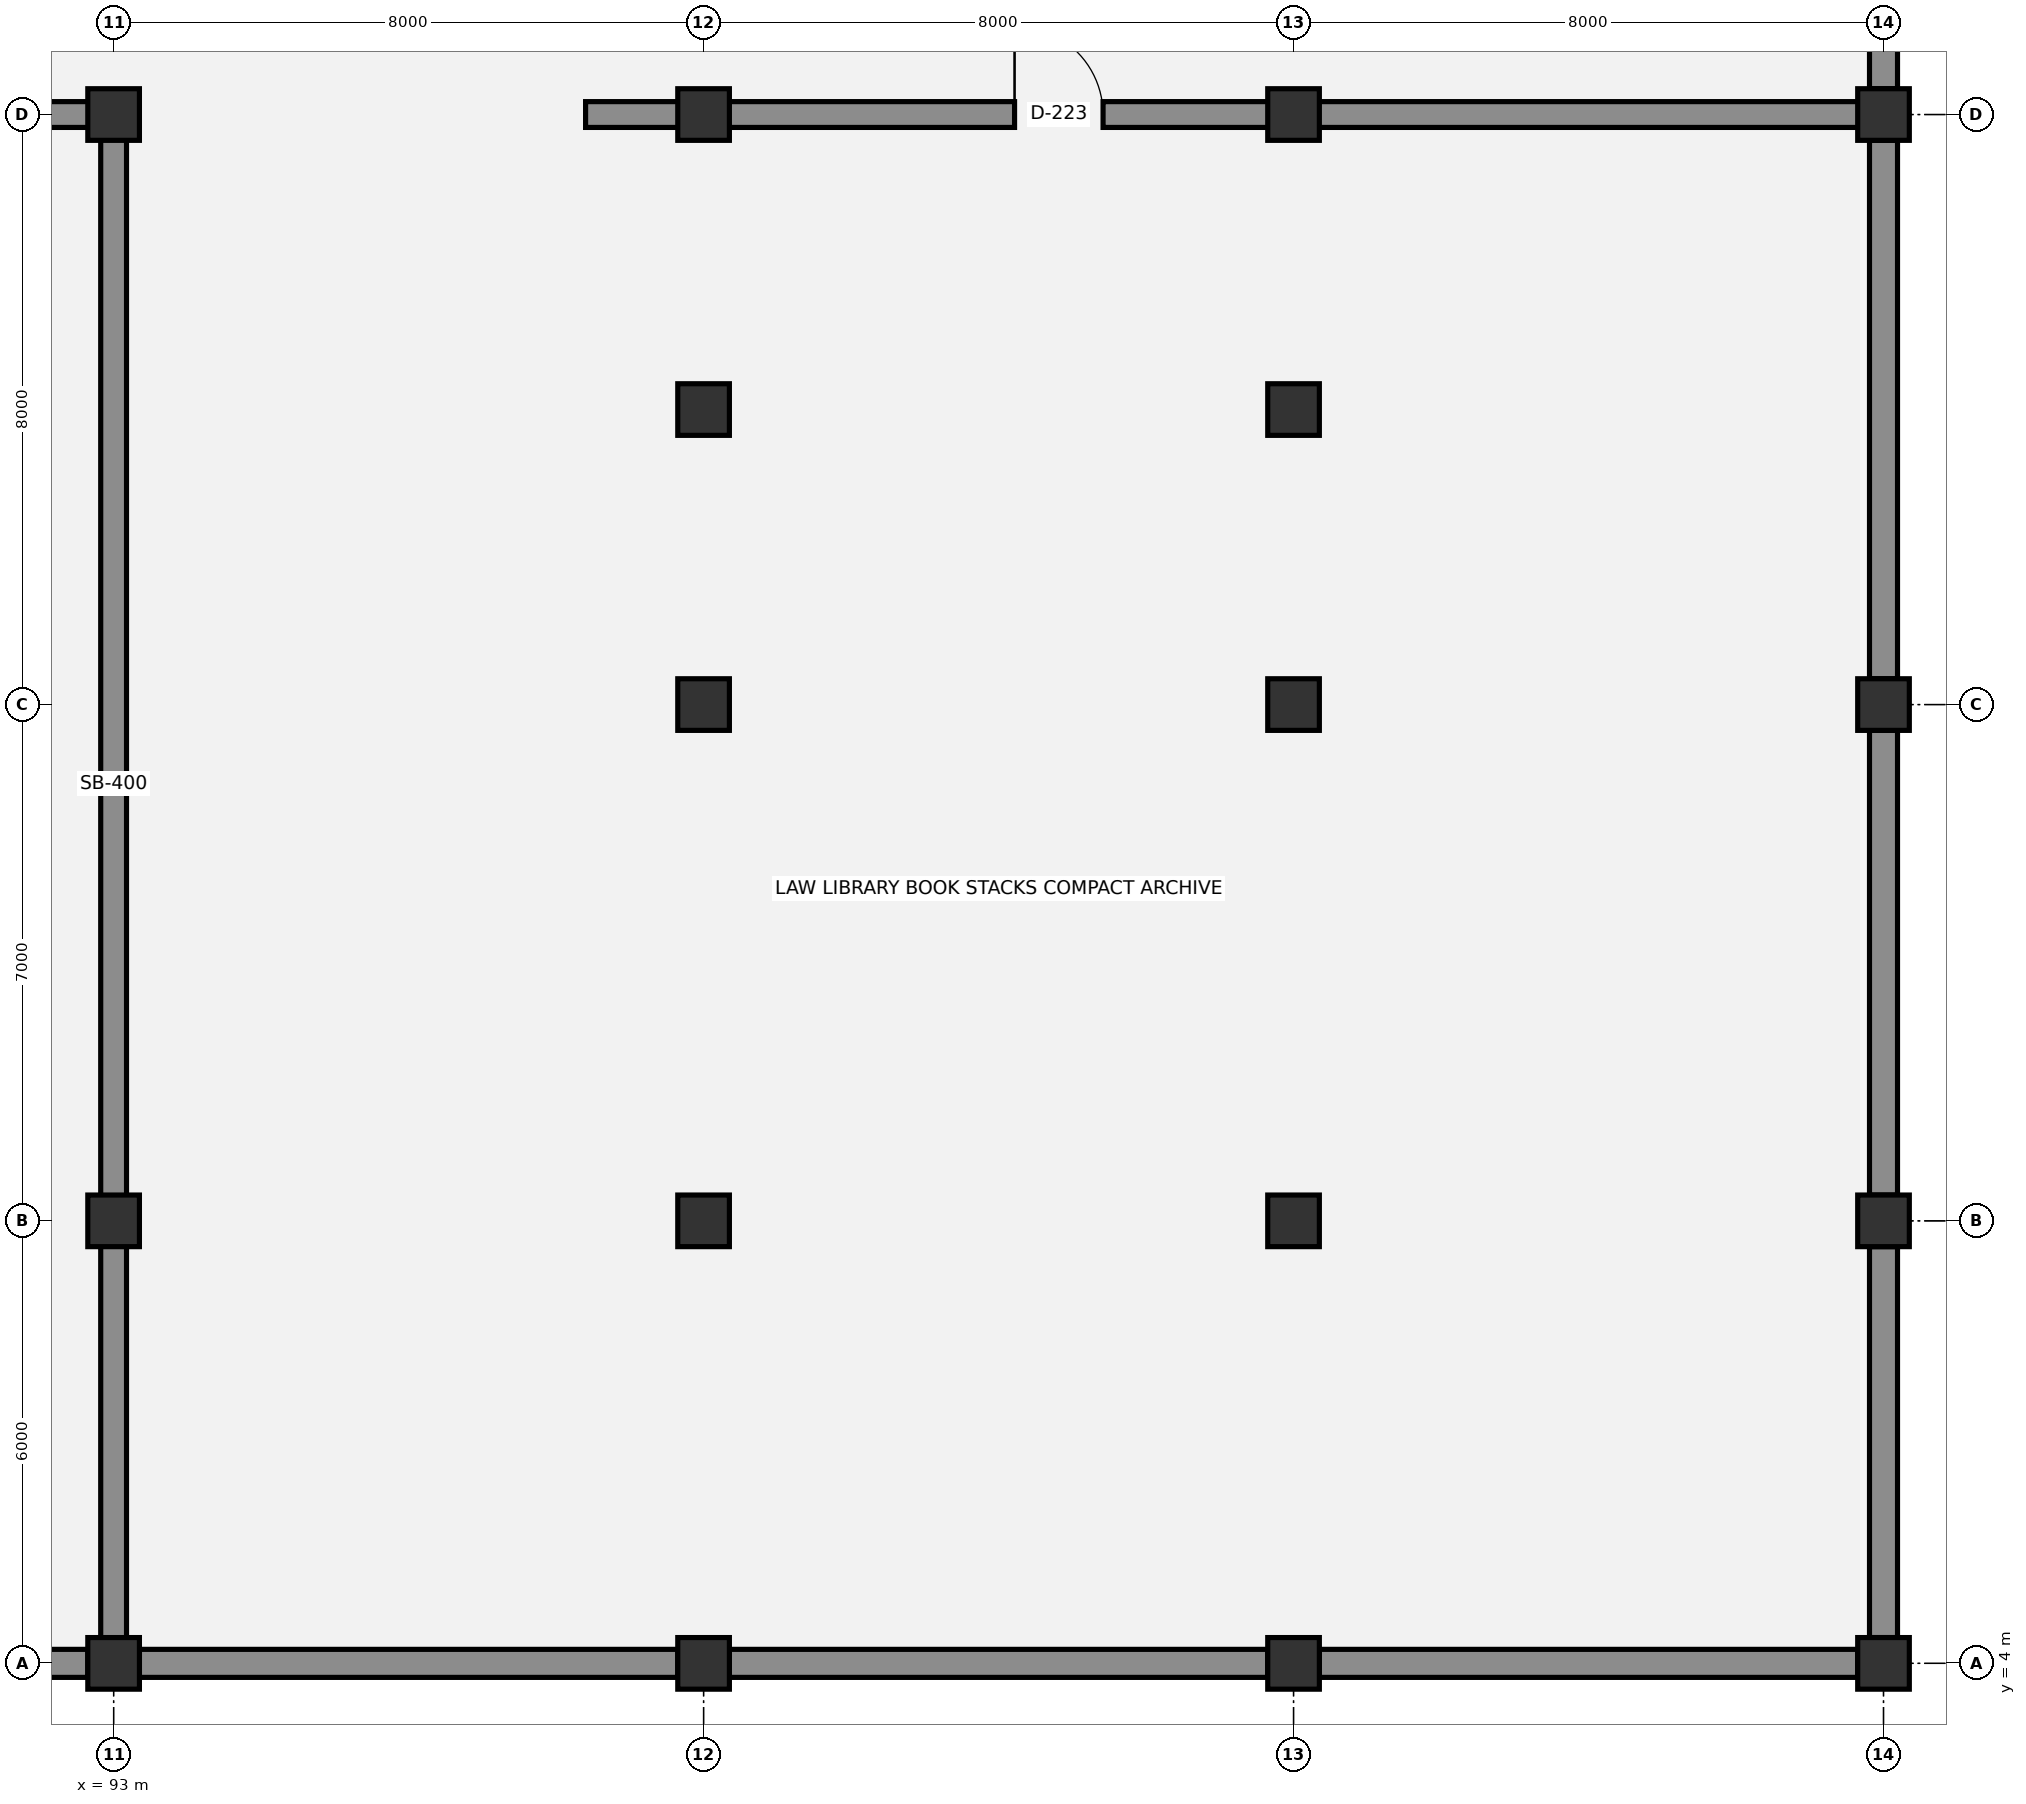
"""IFC4 building model, lengths in metres.
Left out: names, types, materials, properties, quantities, classifications, styles, units other than length and angle.
Written with IfcOpenShell. Run it as: python <this file> out.ifc"""

import sys

from ifc_helpers import new_model, si_unit, direction, frame, frame_2d, origin, origin_2d, place, context, subcontext, project, spatial, rectangle, circle, extrude, element, fill, save


model = new_model("IFC4")
c1 = context("Model", 3, precision=1e-05, world=origin(), true_north=direction((0.0, 1.0)))
c2 = subcontext(c1, "Body", "Model", "MODEL_VIEW")
j1 = project(units=[si_unit("LENGTHUNIT", "METRE"), si_unit("PLANEANGLEUNIT", "RADIAN")], contexts=[c1])
p1 = place(None, origin())
s1 = spatial("IfcSite", under=j1, at=p1, CompositionType="ELEMENT")
p2 = place(p1, origin())
s2 = spatial("IfcBuilding", under=s1, at=p2, CompositionType="ELEMENT")
p3 = place(p2, frame((0.0, 0.0, -4.5)))
s3 = spatial("IfcBuildingStorey", under=s2, at=p3, CompositionType="ELEMENT", Elevation=-4.5)
for number, where, z_axis, x_axis in (
    (1, (93.0, 4.0, 0.0), (0.0, 0.0, 1.0), (1.0, 0.0, 0.0)),
    (2, (93.0, 10.0, 0.0), (0.0, 0.0, 1.0), (1.0, 0.0, 0.0)),
    (3, (93.0, 25.0, 0.0), (0.0, 0.0, 1.0), (1.0, 0.0, 0.0)),
    (4, (101.0, 4.0, 0.0), (0.0, 0.0, 1.0), (1.0, 0.0, 0.0)),
    (5, (101.0, 10.0, 0.0), (0.0, 0.0, 1.0), (1.0, 0.0, 0.0)),
    (6, (101.0, 17.0, 0.0), (0.0, 0.0, 1.0), (1.0, 0.0, 0.0)),
    (7, (101.0, 25.0, 0.0), (0.0, 0.0, 1.0), (1.0, 0.0, 0.0)),
    (8, (109.0, 4.0, 0.0), (0.0, 0.0, 1.0), (1.0, 0.0, 0.0)),
    (9, (109.0, 10.0, 0.0), (0.0, 0.0, 1.0), (1.0, 0.0, 0.0)),
    (10, (109.0, 17.0, 0.0), (0.0, 0.0, 1.0), (1.0, 0.0, 0.0)),
    (11, (109.0, 25.0, 0.0), (0.0, 0.0, 1.0), (1.0, 0.0, 0.0)),
    (12, (117.0, 4.0, 0.0), (0.0, 0.0, 1.0), (1.0, 0.0, 0.0)),
    (13, (117.0, 10.0, 0.0), (0.0, 0.0, 1.0), (1.0, 0.0, 0.0)),
    (14, (117.0, 17.0, 0.0), (0.0, 0.0, 1.0), (1.0, 0.0, 0.0)),
    (15, (117.0, 25.0, 0.0), (0.0, 0.0, 1.0), (1.0, 0.0, 0.0)),
):
    element("IfcColumn", number, at=place(p3, frame(where, z_axis=z_axis, x_axis=x_axis)), inside=s3, PredefinedType="COLUMN", context=c2, shape_type="SweptSolid", body=[
        extrude(rectangle(XDim=0.7, YDim=0.7, at=origin_2d()), origin(), (0.0, 0.0, 1.0), 4.5),
    ])
for number, where, z_axis, x_axis in (
    (16, (101.0, 21.0, 0.0), (0.0, 0.0, 1.0), (1.0, 0.0, 0.0)),
    (17, (109.0, 21.0, 0.0), (0.0, 0.0, 1.0), (1.0, 0.0, 0.0)),
):
    element("IfcColumn", number, at=place(p3, frame(where, z_axis=z_axis, x_axis=x_axis)), inside=s3, PredefinedType="COLUMN", context=c2, shape_type="SweptSolid", body=[
        extrude(circle(Radius=0.35, at=origin_2d()), origin(), (0.0, 0.0, 1.0), 4.5),
    ])
p4 = place(p3, frame((117.0, 31.65, 0.0), z_axis=(0.0, 0.0, 1.0), x_axis=(0.0, -1.0, 0.0)))
e18 = element("IfcWall", 18, at=p4, inside=s3, PredefinedType="STANDARD", context=c2, shape_type="SweptSolid", body=[
    extrude(rectangle(XDim=6.3, YDim=0.38, at=frame_2d((3.15, 0.0))), origin(), (0.0, 0.0, 1.0), 4.16),
])
p5 = place(p3, frame((117.0, 24.65, 0.0), z_axis=(0.0, 0.0, 1.0), x_axis=(0.0, -1.0, 0.0)))
e19 = element("IfcWall", 19, at=p5, inside=s3, PredefinedType="STANDARD", context=c2, shape_type="SweptSolid", body=[
    extrude(rectangle(XDim=7.3, YDim=0.38, at=frame_2d((3.65, 0.0))), origin(), (0.0, 0.0, 1.0), 4.16),
])
p6 = place(p3, frame((117.0, 16.65, 0.0), z_axis=(0.0, 0.0, 1.0), x_axis=(0.0, -1.0, 0.0)))
e20 = element("IfcWall", 20, at=p6, inside=s3, PredefinedType="STANDARD", context=c2, shape_type="SweptSolid", body=[
    extrude(rectangle(XDim=6.3, YDim=0.38, at=frame_2d((3.15, 0.0))), origin(), (0.0, 0.0, 1.0), 4.16),
])
p7 = place(p3, frame((117.0, 9.65, 0.0), z_axis=(0.0, 0.0, 1.0), x_axis=(0.0, -1.0, 0.0)))
e21 = element("IfcWall", 21, at=p7, inside=s3, PredefinedType="STANDARD", context=c2, shape_type="SweptSolid", body=[
    extrude(rectangle(XDim=5.3, YDim=0.38, at=frame_2d((2.65, 0.0))), origin(), (0.0, 0.0, 1.0), 4.16),
])
for number, where, z_axis, x_axis in (
    (22, (116.65, 4.0, 0.0), (0.0, 0.0, 1.0), (-1.0, 0.0, 0.0)),
    (23, (108.65, 4.0, 0.0), (0.0, 0.0, 1.0), (-1.0, 0.0, 0.0)),
    (24, (100.65, 4.0, 0.0), (0.0, 0.0, 1.0), (-1.0, 0.0, 0.0)),
    (25, (92.65, 4.0, 0.0), (0.0, 0.0, 1.0), (-1.0, 0.0, 0.0)),
):
    element("IfcWall", number, at=place(p3, frame(where, z_axis=z_axis, x_axis=x_axis)), inside=s3, PredefinedType="STANDARD", context=c2, shape_type="SweptSolid", body=[
        extrude(rectangle(XDim=7.3, YDim=0.38, at=frame_2d((3.65, 0.0))), origin(), (0.0, 0.0, 1.0), 4.16),
    ])
p8 = place(p3, frame((69.08, 25.0, 0.0), z_axis=(0.0, 0.0, 1.0), x_axis=(1.0, 0.0, 0.0)))
e26 = element("IfcWall", 26, at=p8, inside=s3, PredefinedType="SHEAR", context=c2, shape_type="SweptSolid", body=[
    extrude(rectangle(XDim=23.84, YDim=0.35, at=frame_2d((11.92, 0.0))), origin(), (0.0, 0.0, 1.0), 4.14),
])
p9 = place(p8, frame((11.32, 0.0, 0.0)))
e27 = element("IfcOpeningElement", 27, at=p9, cuts=e26, PredefinedType="OPENING", context=c2, shape_type="SweptSolid", body=[
    extrude(rectangle(XDim=1.2, YDim=2.15, at=frame_2d((0.6, 1.075))), frame((0.0, 0.185, 0.0), z_axis=(0.0, -1.0, 0.0), x_axis=(1.0, 0.0, 0.0)), (0.0, 0.0, 1.0), 0.37),
])
p10 = place(p3, frame((99.4, 25.0, 0.0), z_axis=(0.0, 0.0, 1.0), x_axis=(1.0, 0.0, 0.0)))
e28 = element("IfcWall", 28, at=p10, inside=s3, PredefinedType="SHEAR", context=c2, shape_type="SweptSolid", body=[
    extrude(rectangle(XDim=17.52, YDim=0.35, at=frame_2d((8.76, 0.0))), origin(), (0.0, 0.0, 1.0), 4.14),
])
p11 = place(p10, frame((5.817, 0.0, 0.0)))
e29 = element("IfcOpeningElement", 29, at=p11, cuts=e28, PredefinedType="OPENING", context=c2, shape_type="SweptSolid", body=[
    extrude(rectangle(XDim=1.2, YDim=2.15, at=frame_2d((0.6, 1.075))), frame((0.0, 0.185, 0.0), z_axis=(0.0, -1.0, 0.0), x_axis=(1.0, 0.0, 0.0)), (0.0, 0.0, 1.0), 0.37),
])
p12 = place(p3, frame((93.0, 4.08, 0.0), z_axis=(0.0, 0.0, 1.0), x_axis=(0.0, 1.0, 0.0)))
e30 = element("IfcWall", 30, at=p12, inside=s3, PredefinedType="SHEAR", context=c2, shape_type="SweptSolid", body=[
    extrude(rectangle(XDim=20.84, YDim=0.35, at=frame_2d((10.42, 0.0))), origin(), (0.0, 0.0, 1.0), 4.14),
])
p13 = place(p11, origin())
e31 = element("IfcDoor", 31, at=p13, inside=s3, OperationType="SINGLE_SWING_LEFT", PredefinedType="DOOR", context=c2, shape_type="SweptSolid", body=[
    extrude(rectangle(XDim=1.2, YDim=2.15, at=frame_2d((0.6, 1.075))), frame((0.0, 0.025, 0.0), z_axis=(0.0, -1.0, 0.0), x_axis=(1.0, 0.0, 0.0)), (0.0, 0.0, 1.0), 0.05),
])
fill(e29, e31)
save(model, sys.argv[1])
